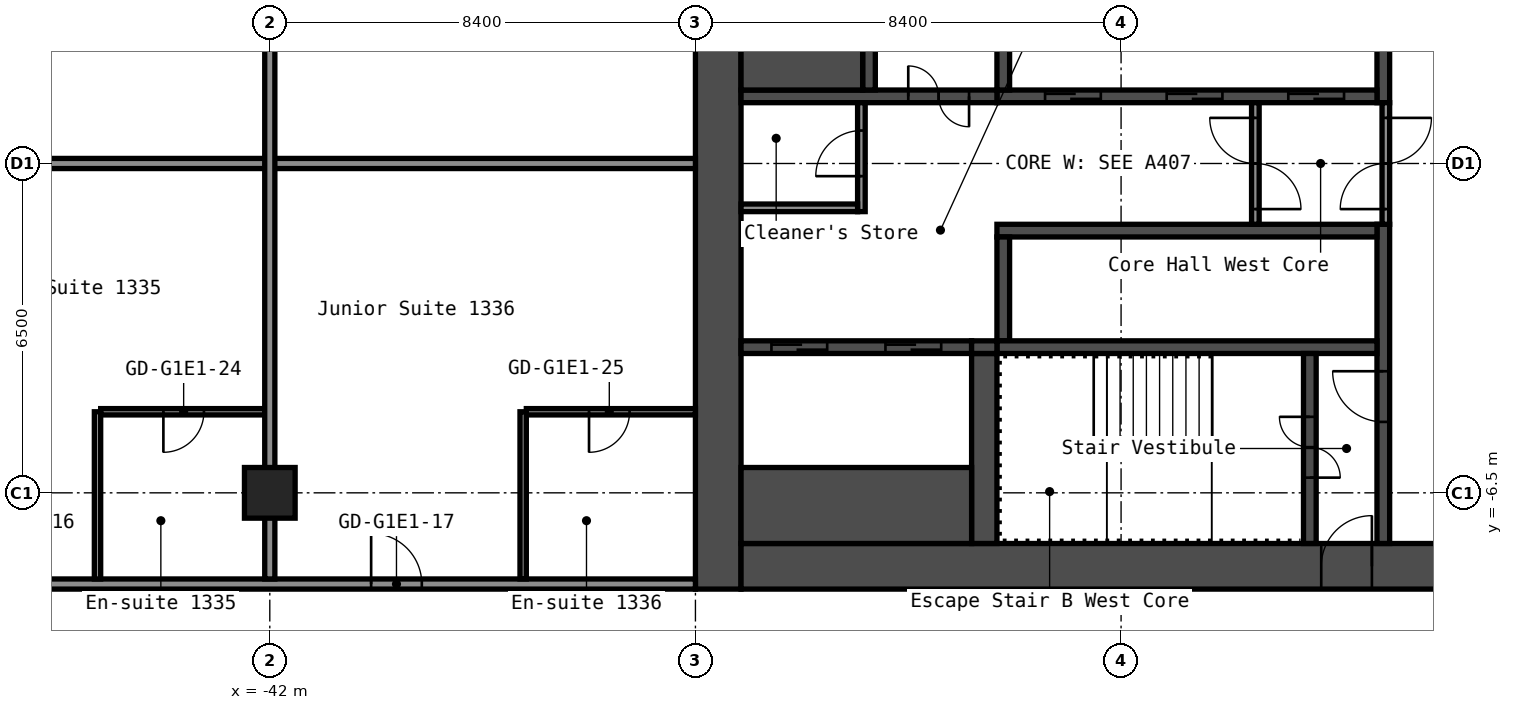
"""IFC4 building model, lengths in metres.
Left out: names, types, materials, properties, quantities, classifications, styles, units other than length and angle.
Written with IfcOpenShell. Run it as: python <this file> out.ifc"""

import sys

from ifc_helpers import new_model, si_unit, direction, frame, frame_2d, origin, origin_2d, place, context, subcontext, project, spatial, rectangle, hollow_rectangle, extrude, element, fill, save


model = new_model("IFC4")
c1 = context("Model", 3, precision=1e-05, world=origin(), true_north=direction((0.0, 1.0)))
c2 = subcontext(c1, "Body", "Model", "MODEL_VIEW")
j1 = project(units=[si_unit("LENGTHUNIT", "METRE"), si_unit("PLANEANGLEUNIT", "RADIAN")], contexts=[c1])
p1 = place(None, origin())
s1 = spatial("IfcSite", under=j1, at=p1, CompositionType="ELEMENT")
p2 = place(p1, origin())
s2 = spatial("IfcBuilding", under=s1, at=p2, CompositionType="ELEMENT")
p3 = place(p2, frame((0.0, 0.0, 48.6)))
s3 = spatial("IfcBuildingStorey", under=s2, at=p3, CompositionType="ELEMENT", Elevation=48.6)
p4 = place(p3, frame((-42.0, -6.5, 0.0), z_axis=(0.0, 0.0, 1.0), x_axis=(1.0, 0.0, 0.0)))
e1 = element("IfcColumn", 1, at=p4, inside=s3, PredefinedType="COLUMN", context=c2, shape_type="SweptSolid", body=[
    extrude(hollow_rectangle(XDim=1.0, YDim=1.0, WallThickness=0.04, at=origin_2d()), origin(), (0.0, 0.0, 1.0), 2.8),
])
p5 = place(p3, frame((-33.15, -8.4, 0.0), z_axis=(0.0, 0.0, 1.0), x_axis=(0.0, 1.0, 0.0)))
e2 = element("IfcWall", 2, at=p5, inside=s3, PredefinedType="SHEAR", context=c2, shape_type="SweptSolid", body=[
    extrude(rectangle(XDim=16.8, YDim=0.9, at=frame_2d((8.4, 0.0))), origin(), (0.0, 0.0, 1.0), 2.8),
])
p6 = place(p3, frame((-32.7, -7.95, 0.0), z_axis=(0.0, 0.0, 1.0), x_axis=(1.0, 0.0, 0.0)))
e3 = element("IfcWall", 3, at=p6, inside=s3, PredefinedType="SHEAR", context=c2, shape_type="SweptSolid", body=[
    extrude(rectangle(XDim=15.0, YDim=0.9, at=frame_2d((7.5, 0.0))), origin(), (0.0, 0.0, 1.0), 2.8),
])
p7 = place(p6, frame((11.45, 0.0, 0.0)))
e4 = element("IfcOpeningElement", 4, at=p7, cuts=e3, PredefinedType="OPENING", context=c2, shape_type="SweptSolid", body=[
    extrude(rectangle(XDim=1.0, YDim=2.1, at=frame_2d((0.5, 1.05))), frame((0.0, 0.46, 0.0), z_axis=(0.0, -1.0, 0.0), x_axis=(1.0, 0.0, 0.0)), (0.0, 0.0, 1.0), 0.92),
])
p8 = place(p3, frame((-20.025, 1.2, 0.0), z_axis=(0.0, 0.0, 1.0), x_axis=(0.0, 1.0, 0.0)))
e5 = element("IfcWall", 5, at=p8, inside=s3, PredefinedType="SHEAR", context=c2, shape_type="SweptSolid", body=[
    extrude(rectangle(XDim=6.3, YDim=0.25, at=frame_2d((3.15, 0.0))), origin(), (0.0, 0.0, 1.0), 2.8),
])
p9 = place(p3, frame((-20.025, -7.5, 0.0), z_axis=(0.0, 0.0, 1.0), x_axis=(0.0, 1.0, 0.0)))
e6 = element("IfcWall", 6, at=p9, inside=s3, PredefinedType="SHEAR", context=c2, shape_type="SweptSolid", body=[
    extrude(rectangle(XDim=6.3, YDim=0.25, at=frame_2d((3.15, 0.0))), origin(), (0.0, 0.0, 1.0), 2.8),
])
p10 = place(p9, frame((2.4, 0.0, 0.0)))
e7 = element("IfcOpeningElement", 7, at=p10, cuts=e6, PredefinedType="OPENING", context=c2, shape_type="SweptSolid", body=[
    extrude(rectangle(XDim=1.0, YDim=2.1, at=frame_2d((0.5, 1.05))), frame((0.0, 0.135, 0.0), z_axis=(0.0, -1.0, 0.0), x_axis=(1.0, 0.0, 0.0)), (0.0, 0.0, 1.0), 0.27),
])
p11 = place(p3, frame((-27.65, 1.325, 0.0), z_axis=(0.0, 0.0, 1.0), x_axis=(1.0, 0.0, 0.0)))
e8 = element("IfcWall", 8, at=p11, inside=s3, PredefinedType="SHEAR", context=c2, shape_type="SweptSolid", body=[
    extrude(rectangle(XDim=7.5, YDim=0.25, at=frame_2d((3.75, 0.0))), origin(), (0.0, 0.0, 1.0), 2.8),
])
p12 = place(p11, frame((5.75, 0.0, 0.0)))
e9 = element("IfcOpeningElement", 9, at=p12, cuts=e8, PredefinedType="OPENING", context=c2, shape_type="SweptSolid", body=[
    extrude(rectangle(XDim=1.1, YDim=2.1, at=frame_2d((0.55, 1.05))), frame((0.0, 0.135, 0.0), z_axis=(0.0, -1.0, 0.0), x_axis=(1.0, 0.0, 0.0)), (0.0, 0.0, 1.0), 0.27),
])
p13 = place(p11, frame((3.35, 0.0, 0.0)))
e10 = element("IfcOpeningElement", 10, at=p13, cuts=e8, PredefinedType="OPENING", context=c2, shape_type="SweptSolid", body=[
    extrude(rectangle(XDim=1.1, YDim=2.1, at=frame_2d((0.55, 1.05))), frame((0.0, 0.135, 0.0), z_axis=(0.0, -1.0, 0.0), x_axis=(1.0, 0.0, 0.0)), (0.0, 0.0, 1.0), 0.27),
])
p14 = place(p11, frame((0.95, 0.0, 0.0)))
e11 = element("IfcOpeningElement", 11, at=p14, cuts=e8, PredefinedType="OPENING", context=c2, shape_type="SweptSolid", body=[
    extrude(rectangle(XDim=1.1, YDim=2.1, at=frame_2d((0.55, 1.05))), frame((0.0, 0.135, 0.0), z_axis=(0.0, -1.0, 0.0), x_axis=(1.0, 0.0, 0.0)), (0.0, 0.0, 1.0), 0.27),
])
p15 = place(p3, frame((-27.525, 1.45, 0.0), z_axis=(0.0, 0.0, 1.0), x_axis=(0.0, 1.0, 0.0)))
e12 = element("IfcWall", 12, at=p15, inside=s3, PredefinedType="SHEAR", context=c2, shape_type="SweptSolid", body=[
    extrude(rectangle(XDim=2.05, YDim=0.25, at=frame_2d((1.025, 0.0))), origin(), (0.0, 0.0, 1.0), 2.8),
])
p16 = place(p3, frame((-32.7, 1.325, 0.0), z_axis=(0.0, 0.0, 1.0), x_axis=(1.0, 0.0, 0.0)))
e13 = element("IfcWall", 13, at=p16, inside=s3, PredefinedType="SHEAR", context=c2, shape_type="SweptSolid", body=[
    extrude(rectangle(XDim=5.05, YDim=0.25, at=frame_2d((2.525, 0.0))), origin(), (0.0, 0.0, 1.0), 2.8),
])
p17 = place(p16, frame((3.3, 0.0, 0.0)))
e14 = element("IfcOpeningElement", 14, at=p17, cuts=e13, PredefinedType="OPENING", context=c2, shape_type="SweptSolid", body=[
    extrude(rectangle(XDim=1.2, YDim=2.1, at=frame_2d((0.6, 1.05))), frame((0.0, 0.135, 0.0), z_axis=(0.0, -1.0, 0.0), x_axis=(1.0, 0.0, 0.0)), (0.0, 0.0, 1.0), 0.27),
])
p18 = place(p3, frame((-30.175, 1.45, 0.0), z_axis=(0.0, 0.0, 1.0), x_axis=(0.0, 1.0, 0.0)))
e15 = element("IfcWall", 15, at=p18, inside=s3, PredefinedType="SHEAR", context=c2, shape_type="SweptSolid", body=[
    extrude(rectangle(XDim=6.05, YDim=0.25, at=frame_2d((3.025, 0.0))), origin(), (0.0, 0.0, 1.0), 2.8),
])
p19 = place(p18, frame((2.625, 0.0, 0.0)))
e16 = element("IfcOpeningElement", 16, at=p19, cuts=e15, PredefinedType="OPENING", context=c2, shape_type="SweptSolid", body=[
    extrude(rectangle(XDim=1.1, YDim=2.1, at=frame_2d((0.55, 1.05))), frame((0.0, 0.135, 0.0), z_axis=(0.0, -1.0, 0.0), x_axis=(1.0, 0.0, 0.0)), (0.0, 0.0, 1.0), 0.27),
])
p20 = place(p3, frame((-32.7, 2.375, 0.0), z_axis=(0.0, 0.0, 1.0), x_axis=(1.0, 0.0, 0.0)))
e17 = element("IfcWall", 17, at=p20, inside=s3, PredefinedType="SHEAR", context=c2, shape_type="SweptSolid", body=[
    extrude(rectangle(XDim=2.4, YDim=1.85, at=frame_2d((1.2, 0.0))), origin(), (0.0, 0.0, 1.0), 2.8),
])
p21 = place(p3, frame((-27.65, -1.325, 0.0), z_axis=(0.0, 0.0, 1.0), x_axis=(1.0, 0.0, 0.0)))
e18 = element("IfcWall", 18, at=p21, inside=s3, PredefinedType="SHEAR", context=c2, shape_type="SweptSolid", body=[
    extrude(rectangle(XDim=7.5, YDim=0.25, at=frame_2d((3.75, 0.0))), origin(), (0.0, 0.0, 1.0), 2.8),
])
p22 = place(p3, frame((-27.525, -3.5, 0.0), z_axis=(0.0, 0.0, 1.0), x_axis=(0.0, 1.0, 0.0)))
e19 = element("IfcWall", 19, at=p22, inside=s3, PredefinedType="SHEAR", context=c2, shape_type="SweptSolid", body=[
    extrude(rectangle(XDim=2.05, YDim=0.25, at=frame_2d((1.025, 0.0))), origin(), (0.0, 0.0, 1.0), 2.8),
])
p23 = place(p3, frame((-27.65, -3.625, 0.0), z_axis=(0.0, 0.0, 1.0), x_axis=(1.0, 0.0, 0.0)))
e20 = element("IfcWall", 20, at=p23, inside=s3, PredefinedType="SHEAR", context=c2, shape_type="SweptSolid", body=[
    extrude(rectangle(XDim=7.5, YDim=0.25, at=frame_2d((3.75, 0.0))), origin(), (0.0, 0.0, 1.0), 2.8),
])
p24 = place(p3, frame((-21.475, -7.5, 0.0), z_axis=(0.0, 0.0, 1.0), x_axis=(0.0, 1.0, 0.0)))
e21 = element("IfcWall", 21, at=p24, inside=s3, PredefinedType="SHEAR", context=c2, shape_type="SweptSolid", body=[
    extrude(rectangle(XDim=3.75, YDim=0.25, at=frame_2d((1.875, 0.0))), origin(), (0.0, 0.0, 1.0), 2.8),
])
p25 = place(p24, frame((1.3, 0.0, 0.0)))
e22 = element("IfcOpeningElement", 22, at=p25, cuts=e21, PredefinedType="OPENING", context=c2, shape_type="SweptSolid", body=[
    extrude(rectangle(XDim=1.2, YDim=2.1, at=frame_2d((0.6, 1.05))), frame((0.0, 0.135, 0.0), z_axis=(0.0, -1.0, 0.0), x_axis=(1.0, 0.0, 0.0)), (0.0, 0.0, 1.0), 0.27),
])
p26 = place(p3, frame((-27.9, -7.5, 0.0), z_axis=(0.0, 0.0, 1.0), x_axis=(0.0, 1.0, 0.0)))
e23 = element("IfcWall", 23, at=p26, inside=s3, PredefinedType="SHEAR", context=c2, shape_type="SweptSolid", body=[
    extrude(rectangle(XDim=3.75, YDim=0.5, at=frame_2d((1.875, 0.0))), origin(), (0.0, 0.0, 1.0), 2.8),
])
p27 = place(p3, frame((-32.7, -3.625, 0.0), z_axis=(0.0, 0.0, 1.0), x_axis=(1.0, 0.0, 0.0)))
e24 = element("IfcWall", 24, at=p27, inside=s3, PredefinedType="SHEAR", context=c2, shape_type="SweptSolid", body=[
    extrude(rectangle(XDim=4.55, YDim=0.25, at=frame_2d((2.275, 0.0))), origin(), (0.0, 0.0, 1.0), 2.8),
])
p28 = place(p27, frame((2.85, 0.0, 0.0)))
e25 = element("IfcOpeningElement", 25, at=p28, cuts=e24, PredefinedType="OPENING", context=c2, shape_type="SweptSolid", body=[
    extrude(rectangle(XDim=1.1, YDim=2.1, at=frame_2d((0.55, 1.05))), frame((0.0, 0.135, 0.0), z_axis=(0.0, -1.0, 0.0), x_axis=(1.0, 0.0, 0.0)), (0.0, 0.0, 1.0), 0.27),
])
p29 = place(p27, frame((0.6, 0.0, 0.0)))
e26 = element("IfcOpeningElement", 26, at=p29, cuts=e24, PredefinedType="OPENING", context=c2, shape_type="SweptSolid", body=[
    extrude(rectangle(XDim=1.1, YDim=2.1, at=frame_2d((0.55, 1.05))), frame((0.0, 0.135, 0.0), z_axis=(0.0, -1.0, 0.0), x_axis=(1.0, 0.0, 0.0)), (0.0, 0.0, 1.0), 0.27),
])
p30 = place(p3, frame((-32.7, -6.75, 0.0), z_axis=(0.0, 0.0, 1.0), x_axis=(1.0, 0.0, 0.0)))
e27 = element("IfcWall", 27, at=p30, inside=s3, PredefinedType="SHEAR", context=c2, shape_type="SweptSolid", body=[
    extrude(rectangle(XDim=4.55, YDim=1.5, at=frame_2d((2.275, 0.0))), origin(), (0.0, 0.0, 1.0), 2.8),
])
p31 = place(p3, frame((-28.15, -3.625, 0.0), z_axis=(0.0, 0.0, 1.0), x_axis=(1.0, 0.0, 0.0)))
e28 = element("IfcWall", 28, at=p31, inside=s3, PredefinedType="SHEAR", context=c2, shape_type="SweptSolid", body=[
    extrude(rectangle(XDim=0.5, YDim=0.25, at=frame_2d((0.25, 0.0))), origin(), (0.0, 0.0, 1.0), 2.8),
])
p32 = place(p3, frame((-19.975, -1.2, 0.0), z_axis=(0.0, 0.0, 1.0), x_axis=(0.0, 1.0, 0.0)))
e29 = element("IfcWall", 29, at=p32, inside=s3, PredefinedType="PARTITIONING", context=c2, shape_type="SweptSolid", body=[
    extrude(rectangle(XDim=2.4, YDim=0.15, at=frame_2d((1.2, 0.0))), origin(), (0.0, 0.0, 1.0), 2.8),
])
p33 = place(p32, frame((0.3, 0.0, 0.0)))
e30 = element("IfcOpeningElement", 30, at=p33, cuts=e29, PredefinedType="OPENING", context=c2, shape_type="SweptSolid", body=[
    extrude(rectangle(XDim=1.8, YDim=2.1, at=frame_2d((0.9, 1.05))), frame((0.0, 0.085, 0.0), z_axis=(0.0, -1.0, 0.0), x_axis=(1.0, 0.0, 0.0)), (0.0, 0.0, 1.0), 0.17),
])
p34 = place(p3, frame((-22.55, -1.2, 0.0), z_axis=(0.0, 0.0, 1.0), x_axis=(0.0, 1.0, 0.0)))
e31 = element("IfcWall", 31, at=p34, inside=s3, PredefinedType="PARTITIONING", context=c2, shape_type="SweptSolid", body=[
    extrude(rectangle(XDim=2.4, YDim=0.15, at=frame_2d((1.2, 0.0))), origin(), (0.0, 0.0, 1.0), 2.8),
])
p35 = place(p34, frame((0.3, 0.0, 0.0)))
e32 = element("IfcOpeningElement", 32, at=p35, cuts=e31, PredefinedType="OPENING", context=c2, shape_type="SweptSolid", body=[
    extrude(rectangle(XDim=1.8, YDim=2.1, at=frame_2d((0.9, 1.05))), frame((0.0, 0.085, 0.0), z_axis=(0.0, -1.0, 0.0), x_axis=(1.0, 0.0, 0.0)), (0.0, 0.0, 1.0), 0.17),
])
p36 = place(p3, frame((-30.325, -0.95, 0.0), z_axis=(0.0, 0.0, 1.0), x_axis=(0.0, 1.0, 0.0)))
e33 = element("IfcWall", 33, at=p36, inside=s3, PredefinedType="PARTITIONING", context=c2, shape_type="SweptSolid", body=[
    extrude(rectangle(XDim=2.15, YDim=0.15, at=frame_2d((1.075, 0.0))), origin(), (0.0, 0.0, 1.0), 2.8),
])
p37 = place(p36, frame((0.7, 0.0, 0.0)))
e34 = element("IfcOpeningElement", 34, at=p37, cuts=e33, PredefinedType="OPENING", context=c2, shape_type="SweptSolid", body=[
    extrude(rectangle(XDim=0.9, YDim=2.1, at=frame_2d((0.45, 1.05))), frame((0.0, 0.085, 0.0), z_axis=(0.0, -1.0, 0.0), x_axis=(1.0, 0.0, 0.0)), (0.0, 0.0, 1.0), 0.17),
])
p38 = place(p3, frame((-32.7, -0.875, 0.0), z_axis=(0.0, 0.0, 1.0), x_axis=(1.0, 0.0, 0.0)))
e35 = element("IfcWall", 35, at=p38, inside=s3, PredefinedType="PARTITIONING", context=c2, shape_type="SweptSolid", body=[
    extrude(rectangle(XDim=2.3, YDim=0.15, at=frame_2d((1.15, 0.0))), origin(), (0.0, 0.0, 1.0), 2.8),
])
p39 = place(p3, frame((-48.6, -8.3, 0.0), z_axis=(0.0, 0.0, 1.0), x_axis=(1.0, 0.0, 0.0)))
e36 = element("IfcWall", 36, at=p39, inside=s3, PredefinedType="PARTITIONING", context=c2, shape_type="SweptSolid", body=[
    extrude(rectangle(XDim=15.0, YDim=0.2, at=frame_2d((7.5, 0.0))), origin(), (0.0, 0.0, 1.0), 2.8),
])
p40 = place(p39, frame((1.1, 0.0, 0.0)))
e37 = element("IfcOpeningElement", 37, at=p40, cuts=e36, PredefinedType="OPENING", context=c2, shape_type="SweptSolid", body=[
    extrude(rectangle(XDim=1.0, YDim=2.1, at=frame_2d((0.5, 1.05))), frame((0.0, 0.11, 0.0), z_axis=(0.0, -1.0, 0.0), x_axis=(1.0, 0.0, 0.0)), (0.0, 0.0, 1.0), 0.22),
])
p41 = place(p39, frame((8.6, 0.0, 0.0)))
e38 = element("IfcOpeningElement", 38, at=p41, cuts=e36, PredefinedType="OPENING", context=c2, shape_type="SweptSolid", body=[
    extrude(rectangle(XDim=1.0, YDim=2.1, at=frame_2d((0.5, 1.05))), frame((0.0, 0.11, 0.0), z_axis=(0.0, -1.0, 0.0), x_axis=(1.0, 0.0, 0.0)), (0.0, 0.0, 1.0), 0.22),
])
p42 = place(p3, frame((-45.337, -4.9, 0.0), z_axis=(0.0, 0.0, 1.0), x_axis=(1.0, 0.0, 0.0)))
e39 = element("IfcWall", 39, at=p42, inside=s3, PredefinedType="PARTITIONING", context=c2, shape_type="SweptSolid", body=[
    extrude(rectangle(XDim=3.237, YDim=0.125, at=frame_2d((1.619, 0.0))), origin(), (0.0, 0.0, 1.0), 2.8),
])
p43 = place(p42, frame((1.238, 0.0, 0.0)))
e40 = element("IfcOpeningElement", 40, at=p43, cuts=e39, PredefinedType="OPENING", context=c2, shape_type="SweptSolid", body=[
    extrude(rectangle(XDim=0.8, YDim=2.1, at=frame_2d((0.4, 1.05))), frame((0.0, 0.073, 0.0), z_axis=(0.0, -1.0, 0.0), x_axis=(1.0, 0.0, 0.0)), (0.0, 0.0, 1.0), 0.145),
])
p44 = place(p3, frame((-36.938, -4.9, 0.0), z_axis=(0.0, 0.0, 1.0), x_axis=(1.0, 0.0, 0.0)))
e41 = element("IfcWall", 41, at=p44, inside=s3, PredefinedType="PARTITIONING", context=c2, shape_type="SweptSolid", body=[
    extrude(rectangle(XDim=3.337, YDim=0.125, at=frame_2d((1.669, 0.0))), origin(), (0.0, 0.0, 1.0), 2.8),
])
p45 = place(p44, frame((1.238, 0.0, 0.0)))
e42 = element("IfcOpeningElement", 42, at=p45, cuts=e41, PredefinedType="OPENING", context=c2, shape_type="SweptSolid", body=[
    extrude(rectangle(XDim=0.8, YDim=2.1, at=frame_2d((0.4, 1.05))), frame((0.0, 0.073, 0.0), z_axis=(0.0, -1.0, 0.0), x_axis=(1.0, 0.0, 0.0)), (0.0, 0.0, 1.0), 0.145),
])
p46 = place(p3, frame((-48.5, 0.0, 0.0), z_axis=(0.0, 0.0, 1.0), x_axis=(1.0, 0.0, 0.0)))
e43 = element("IfcWall", 43, at=p46, inside=s3, PredefinedType="PARTITIONING", context=c2, shape_type="SweptSolid", body=[
    extrude(rectangle(XDim=14.9, YDim=0.2, at=frame_2d((7.45, 0.0))), origin(), (0.0, 0.0, 1.0), 2.8),
])
p47 = place(p3, frame((-45.4, -8.2, 0.0), z_axis=(0.0, 0.0, 1.0), x_axis=(0.0, 1.0, 0.0)))
e44 = element("IfcWall", 44, at=p47, inside=s3, PredefinedType="PARTITIONING", context=c2, shape_type="SweptSolid", body=[
    extrude(rectangle(XDim=3.3, YDim=0.125, at=frame_2d((1.65, 0.0))), origin(), (0.0, 0.0, 1.0), 2.8),
])
p48 = place(p3, frame((-42.0, -8.2, 0.0), z_axis=(0.0, 0.0, 1.0), x_axis=(0.0, 1.0, 0.0)))
e45 = element("IfcWall", 45, at=p48, inside=s3, PredefinedType="PARTITIONING", context=c2, shape_type="SweptSolid", body=[
    extrude(rectangle(XDim=16.4, YDim=0.2, at=frame_2d((8.2, 0.0))), origin(), (0.0, 0.0, 1.0), 2.8),
])
p49 = place(p3, frame((-37.0, -8.2, 0.0), z_axis=(0.0, 0.0, 1.0), x_axis=(0.0, 1.0, 0.0)))
e46 = element("IfcWall", 46, at=p49, inside=s3, PredefinedType="PARTITIONING", context=c2, shape_type="SweptSolid", body=[
    extrude(rectangle(XDim=3.3, YDim=0.125, at=frame_2d((1.65, 0.0))), origin(), (0.0, 0.0, 1.0), 2.8),
])
p50 = place(p7, origin())
e47 = element("IfcDoor", 47, at=p50, inside=s3, OperationType="SINGLE_SWING_LEFT", PredefinedType="DOOR", context=c2, shape_type="SweptSolid", body=[
    extrude(rectangle(XDim=1.0, YDim=2.1, at=frame_2d((0.5, 1.05))), frame((0.0, 0.025, 0.0), z_axis=(0.0, -1.0, 0.0), x_axis=(1.0, 0.0, 0.0)), (0.0, 0.0, 1.0), 0.05),
])
fill(e4, e47)
p51 = place(p25, origin())
e48 = element("IfcDoor", 48, at=p51, inside=s3, OperationType="DOUBLE_DOOR_SINGLE_SWING", PredefinedType="DOOR", context=c2, shape_type="SweptSolid", body=[
    extrude(rectangle(XDim=1.2, YDim=2.1, at=frame_2d((0.6, 1.05))), frame((0.0, 0.025, 0.0), z_axis=(0.0, -1.0, 0.0), x_axis=(1.0, 0.0, 0.0)), (0.0, 0.0, 1.0), 0.05),
])
fill(e22, e48)
p52 = place(p10, origin())
e49 = element("IfcDoor", 49, at=p52, inside=s3, OperationType="SINGLE_SWING_LEFT", PredefinedType="DOOR", context=c2, shape_type="SweptSolid", body=[
    extrude(rectangle(XDim=1.0, YDim=2.1, at=frame_2d((0.5, 1.05))), frame((0.0, 0.025, 0.0), z_axis=(0.0, -1.0, 0.0), x_axis=(1.0, 0.0, 0.0)), (0.0, 0.0, 1.0), 0.05),
])
fill(e7, e49)
p53 = place(p17, origin())
e50 = element("IfcDoor", 50, at=p53, inside=s3, OperationType="DOUBLE_DOOR_SINGLE_SWING", PredefinedType="DOOR", context=c2, shape_type="SweptSolid", body=[
    extrude(rectangle(XDim=1.2, YDim=2.1, at=frame_2d((0.6, 1.05))), frame((0.0, 0.025, 0.0), z_axis=(0.0, -1.0, 0.0), x_axis=(1.0, 0.0, 0.0)), (0.0, 0.0, 1.0), 0.05),
])
fill(e14, e50)
p54 = place(p33, origin())
e51 = element("IfcDoor", 51, at=p54, inside=s3, OperationType="DOUBLE_DOOR_SINGLE_SWING", PredefinedType="DOOR", context=c2, shape_type="SweptSolid", body=[
    extrude(rectangle(XDim=1.8, YDim=2.1, at=frame_2d((0.9, 1.05))), frame((0.0, 0.025, 0.0), z_axis=(0.0, -1.0, 0.0), x_axis=(1.0, 0.0, 0.0)), (0.0, 0.0, 1.0), 0.05),
])
fill(e30, e51)
p55 = place(p35, origin())
e52 = element("IfcDoor", 52, at=p55, inside=s3, OperationType="DOUBLE_DOOR_SINGLE_SWING", PredefinedType="DOOR", context=c2, shape_type="SweptSolid", body=[
    extrude(rectangle(XDim=1.8, YDim=2.1, at=frame_2d((0.9, 1.05))), frame((0.0, 0.025, 0.0), z_axis=(0.0, -1.0, 0.0), x_axis=(1.0, 0.0, 0.0)), (0.0, 0.0, 1.0), 0.05),
])
fill(e32, e52)
p56 = place(p37, origin())
e53 = element("IfcDoor", 53, at=p56, inside=s3, OperationType="SINGLE_SWING_RIGHT", PredefinedType="DOOR", context=c2, shape_type="SweptSolid", body=[
    extrude(rectangle(XDim=0.9, YDim=2.1, at=frame_2d((0.45, 1.05))), frame((0.0, 0.025, 0.0), z_axis=(0.0, -1.0, 0.0), x_axis=(1.0, 0.0, 0.0)), (0.0, 0.0, 1.0), 0.05),
])
fill(e34, e53)
p57 = place(p12, origin())
e54 = element("IfcDoor", 54, at=p57, inside=s3, OperationType="DOUBLE_DOOR_SLIDING", PredefinedType="DOOR", context=c2, shape_type="SweptSolid", body=[
    extrude(rectangle(XDim=1.1, YDim=2.1, at=frame_2d((0.55, 1.05))), frame((0.0, 0.025, 0.0), z_axis=(0.0, -1.0, 0.0), x_axis=(1.0, 0.0, 0.0)), (0.0, 0.0, 1.0), 0.05),
])
fill(e9, e54)
p58 = place(p13, origin())
e55 = element("IfcDoor", 55, at=p58, inside=s3, OperationType="DOUBLE_DOOR_SLIDING", PredefinedType="DOOR", context=c2, shape_type="SweptSolid", body=[
    extrude(rectangle(XDim=1.1, YDim=2.1, at=frame_2d((0.55, 1.05))), frame((0.0, 0.025, 0.0), z_axis=(0.0, -1.0, 0.0), x_axis=(1.0, 0.0, 0.0)), (0.0, 0.0, 1.0), 0.05),
])
fill(e10, e55)
p59 = place(p14, origin())
e56 = element("IfcDoor", 56, at=p59, inside=s3, OperationType="DOUBLE_DOOR_SLIDING", PredefinedType="DOOR", context=c2, shape_type="SweptSolid", body=[
    extrude(rectangle(XDim=1.1, YDim=2.1, at=frame_2d((0.55, 1.05))), frame((0.0, 0.025, 0.0), z_axis=(0.0, -1.0, 0.0), x_axis=(1.0, 0.0, 0.0)), (0.0, 0.0, 1.0), 0.05),
])
fill(e11, e56)
p60 = place(p28, origin())
e57 = element("IfcDoor", 57, at=p60, inside=s3, OperationType="DOUBLE_DOOR_SLIDING", PredefinedType="DOOR", context=c2, shape_type="SweptSolid", body=[
    extrude(rectangle(XDim=1.1, YDim=2.1, at=frame_2d((0.55, 1.05))), frame((0.0, 0.025, 0.0), z_axis=(0.0, -1.0, 0.0), x_axis=(1.0, 0.0, 0.0)), (0.0, 0.0, 1.0), 0.05),
])
fill(e25, e57)
p61 = place(p29, origin())
e58 = element("IfcDoor", 58, at=p61, inside=s3, OperationType="DOUBLE_DOOR_SLIDING", PredefinedType="DOOR", context=c2, shape_type="SweptSolid", body=[
    extrude(rectangle(XDim=1.1, YDim=2.1, at=frame_2d((0.55, 1.05))), frame((0.0, 0.025, 0.0), z_axis=(0.0, -1.0, 0.0), x_axis=(1.0, 0.0, 0.0)), (0.0, 0.0, 1.0), 0.05),
])
fill(e26, e58)
p62 = place(p41, origin())
e59 = element("IfcDoor", 59, at=p62, inside=s3, OperationType="SINGLE_SWING_RIGHT", PredefinedType="DOOR", context=c2, shape_type="SweptSolid", body=[
    extrude(rectangle(XDim=1.0, YDim=2.1, at=frame_2d((0.5, 1.05))), frame((0.0, 0.025, 0.0), z_axis=(0.0, -1.0, 0.0), x_axis=(1.0, 0.0, 0.0)), (0.0, 0.0, 1.0), 0.05),
])
fill(e38, e59)
p63 = place(p43, origin())
e60 = element("IfcDoor", 60, at=p63, inside=s3, OperationType="SINGLE_SWING_LEFT", PredefinedType="DOOR", context=c2, shape_type="SweptSolid", body=[
    extrude(rectangle(XDim=0.8, YDim=2.1, at=frame_2d((0.4, 1.05))), frame((0.0, 0.025, 0.0), z_axis=(0.0, -1.0, 0.0), x_axis=(1.0, 0.0, 0.0)), (0.0, 0.0, 1.0), 0.05),
])
fill(e40, e60)
p64 = place(p45, origin())
e61 = element("IfcDoor", 61, at=p64, inside=s3, OperationType="SINGLE_SWING_LEFT", PredefinedType="DOOR", context=c2, shape_type="SweptSolid", body=[
    extrude(rectangle(XDim=0.8, YDim=2.1, at=frame_2d((0.4, 1.05))), frame((0.0, 0.025, 0.0), z_axis=(0.0, -1.0, 0.0), x_axis=(1.0, 0.0, 0.0)), (0.0, 0.0, 1.0), 0.05),
])
fill(e42, e61)
save(model, sys.argv[1])
